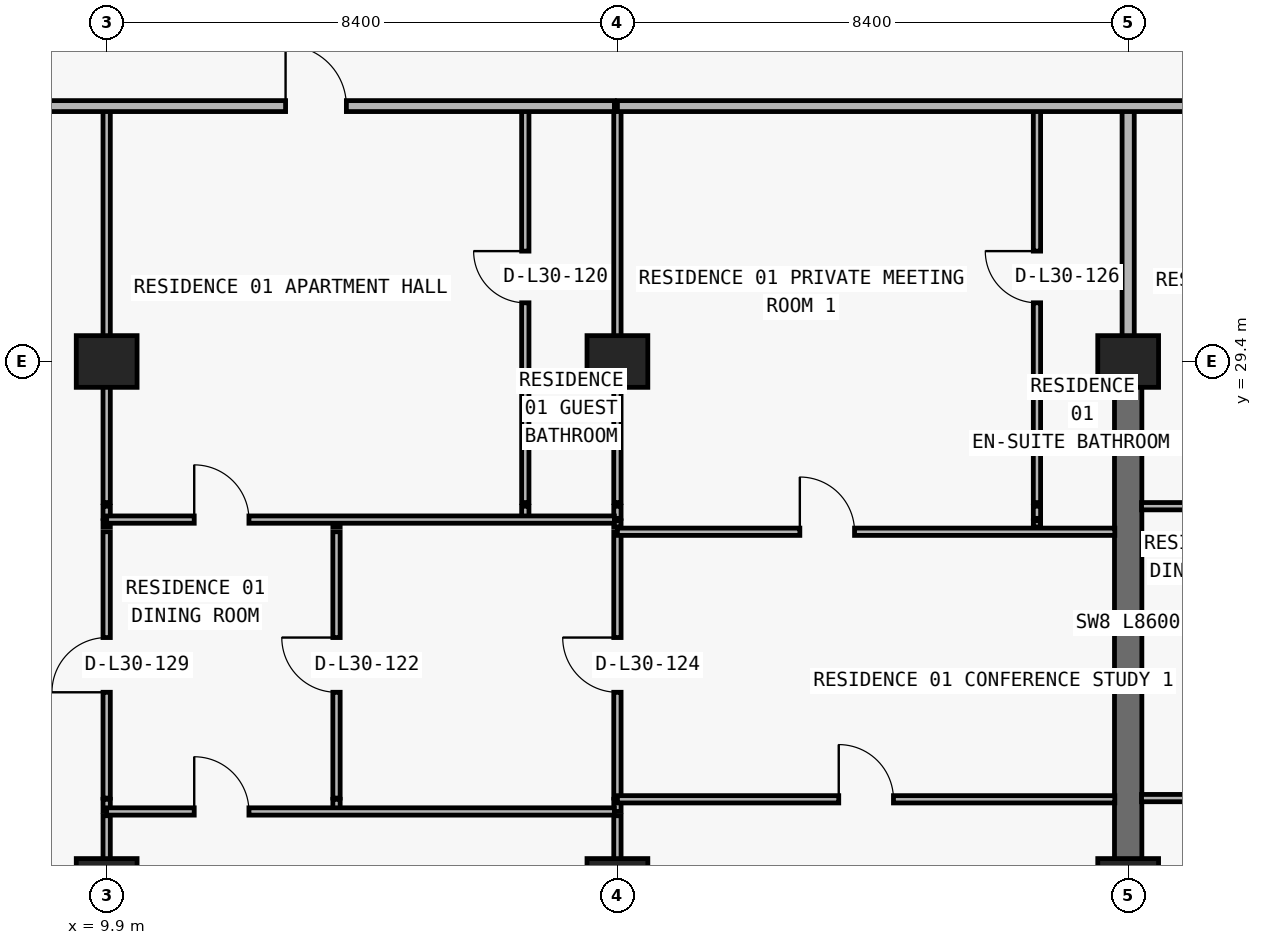
"""IFC4 building model, lengths in metres.
Left out: names, types, materials, properties, quantities, classifications, styles, units other than length and angle.
Written with IfcOpenShell. Run it as: python <this file> out.ifc"""

import sys

from ifc_helpers import new_model, si_unit, direction, frame, frame_2d, origin, origin_2d, place, context, subcontext, project, spatial, rectangle, extrude, element, fill, save


model = new_model("IFC4")
c1 = context("Model", 3, precision=1e-05, world=origin(), true_north=direction((0.0, 1.0)))
c2 = subcontext(c1, "Body", "Model", "MODEL_VIEW")
j1 = project(units=[si_unit("LENGTHUNIT", "METRE"), si_unit("PLANEANGLEUNIT", "RADIAN")], contexts=[c1])
p1 = place(None, origin())
s1 = spatial("IfcSite", under=j1, at=p1, CompositionType="ELEMENT")
p2 = place(p1, origin())
s2 = spatial("IfcBuilding", under=s1, at=p2, CompositionType="ELEMENT")
p3 = place(p2, frame((0.0, 0.0, 112.5)))
s3 = spatial("IfcBuildingStorey", under=s2, at=p3, CompositionType="ELEMENT", Elevation=112.5)
for number, where, z_axis, x_axis in (
    (1, (9.9, 20.8, 0.0), (0.0, 0.0, 1.0), (1.0, 0.0, 0.0)),
    (2, (18.3, 20.8, 0.0), (0.0, 0.0, 1.0), (1.0, 0.0, 0.0)),
    (3, (26.7, 20.8, 0.0), (0.0, 0.0, 1.0), (1.0, 0.0, 0.0)),
    (4, (9.9, 29.4, 0.0), (0.0, 0.0, 1.0), (1.0, 0.0, 0.0)),
    (5, (18.3, 29.4, 0.0), (0.0, 0.0, 1.0), (1.0, 0.0, 0.0)),
    (6, (26.7, 29.4, 0.0), (0.0, 0.0, 1.0), (1.0, 0.0, 0.0)),
):
    element("IfcColumn", number, at=place(p3, frame(where, z_axis=z_axis, x_axis=x_axis)), inside=s3, PredefinedType="COLUMN", context=c2, shape_type="SweptSolid", body=[
        extrude(rectangle(XDim=1.0, YDim=0.85, at=origin_2d()), origin(), (0.0, 0.0, 1.0), 3.05),
    ])
p4 = place(p3, frame((26.7, 20.8, 0.0), z_axis=(0.0, 0.0, 1.0), x_axis=(0.0, 1.0, 0.0)))
e7 = element("IfcWall", 7, at=p4, inside=s3, PredefinedType="SHEAR", context=c2, shape_type="SweptSolid", body=[
    extrude(rectangle(XDim=8.6, YDim=0.45, at=frame_2d((4.3, 0.0))), origin(), (0.0, 0.0, 1.0), 3.05),
])
p5 = place(p3, frame((9.9, 8.84, 0.0), z_axis=(0.0, 0.0, 1.0), x_axis=(0.0, 1.0, 0.0)))
e8 = element("IfcWall", 8, at=p5, inside=s3, PredefinedType="PARTITIONING", context=c2, shape_type="SweptSolid", body=[
    extrude(rectangle(XDim=13.09, YDim=0.12, at=frame_2d((6.545, 0.0))), origin(), (0.0, 0.0, 1.0), 2.174),
])
p6 = place(p3, frame((9.9, 22.0, 0.0), z_axis=(0.0, 0.0, 1.0), x_axis=(0.0, 1.0, 0.0)))
e9 = element("IfcWall", 9, at=p6, inside=s3, PredefinedType="PARTITIONING", context=c2, shape_type="SweptSolid", body=[
    extrude(rectangle(XDim=0.2, YDim=0.12, at=frame_2d((0.1, 0.0))), origin(), (0.0, 0.0, 1.0), 2.174),
])
p7 = place(p3, frame((9.9, 22.22, 0.0), z_axis=(0.0, 0.0, 1.0), x_axis=(0.0, 1.0, 0.0)))
e10 = element("IfcWall", 10, at=p7, inside=s3, PredefinedType="PARTITIONING", context=c2, shape_type="SweptSolid", body=[
    extrude(rectangle(XDim=4.38, YDim=0.12, at=frame_2d((2.19, 0.0))), origin(), (0.0, 0.0, 1.0), 2.174),
])
p8 = place(p7, frame((1.74, 0.0, 0.0)))
e11 = element("IfcOpeningElement", 11, at=p8, cuts=e10, PredefinedType="OPENING", context=c2, shape_type="SweptSolid", body=[
    extrude(rectangle(XDim=0.9, YDim=2.124, at=frame_2d((0.45, 1.062))), frame((0.0, 0.07, 0.0), z_axis=(0.0, -1.0, 0.0), x_axis=(1.0, 0.0, 0.0)), (0.0, 0.0, 1.0), 0.14),
])
p9 = place(p3, frame((9.9, 26.68, 0.0), z_axis=(0.0, 0.0, 1.0), x_axis=(0.0, 1.0, 0.0)))
e12 = element("IfcWall", 12, at=p9, inside=s3, PredefinedType="PARTITIONING", context=c2, shape_type="SweptSolid", body=[
    extrude(rectangle(XDim=0.1, YDim=0.12, at=frame_2d((0.05, 0.0))), origin(), (0.0, 0.0, 1.0), 2.174),
])
p10 = place(p3, frame((9.9, 26.82, 0.0), z_axis=(0.0, 0.0, 1.0), x_axis=(0.0, 1.0, 0.0)))
e13 = element("IfcWall", 13, at=p10, inside=s3, PredefinedType="PARTITIONING", context=c2, shape_type="SweptSolid", body=[
    extrude(rectangle(XDim=0.2, YDim=0.12, at=frame_2d((0.1, 0.0))), origin(), (0.0, 0.0, 1.0), 2.174),
])
p11 = place(p3, frame((9.9, 27.08, 0.0), z_axis=(0.0, 0.0, 1.0), x_axis=(0.0, 1.0, 0.0)))
e14 = element("IfcWall", 14, at=p11, inside=s3, PredefinedType="PARTITIONING", context=c2, shape_type="SweptSolid", body=[
    extrude(rectangle(XDim=6.52, YDim=0.12, at=frame_2d((3.26, 0.0))), origin(), (0.0, 0.0, 1.0), 2.174),
])
p12 = place(p3, frame((13.68, 22.0, 0.0), z_axis=(0.0, 0.0, 1.0), x_axis=(0.0, 1.0, 0.0)))
e15 = element("IfcWall", 15, at=p12, inside=s3, PredefinedType="PARTITIONING", context=c2, shape_type="SweptSolid", body=[
    extrude(rectangle(XDim=0.2, YDim=0.12, at=frame_2d((0.1, 0.0))), origin(), (0.0, 0.0, 1.0), 3.05),
])
p13 = place(p3, frame((13.68, 22.22, 0.0), z_axis=(0.0, 0.0, 1.0), x_axis=(0.0, 1.0, 0.0)))
e16 = element("IfcWall", 16, at=p13, inside=s3, PredefinedType="PARTITIONING", context=c2, shape_type="SweptSolid", body=[
    extrude(rectangle(XDim=4.38, YDim=0.12, at=frame_2d((2.19, 0.0))), origin(), (0.0, 0.0, 1.0), 3.05),
])
p14 = place(p13, frame((1.74, 0.0, 0.0)))
e17 = element("IfcOpeningElement", 17, at=p14, cuts=e16, PredefinedType="OPENING", context=c2, shape_type="SweptSolid", body=[
    extrude(rectangle(XDim=0.9, YDim=2.15, at=frame_2d((0.45, 1.075))), frame((0.0, 0.07, 0.0), z_axis=(0.0, -1.0, 0.0), x_axis=(1.0, 0.0, 0.0)), (0.0, 0.0, 1.0), 0.14),
])
p15 = place(p3, frame((13.68, 26.68, 0.0), z_axis=(0.0, 0.0, 1.0), x_axis=(0.0, 1.0, 0.0)))
e18 = element("IfcWall", 18, at=p15, inside=s3, PredefinedType="PARTITIONING", context=c2, shape_type="SweptSolid", body=[
    extrude(rectangle(XDim=0.1, YDim=0.12, at=frame_2d((0.05, 0.0))), origin(), (0.0, 0.0, 1.0), 3.05),
])
p16 = place(p3, frame((16.785, 26.82, 0.0), z_axis=(0.0, 0.0, 1.0), x_axis=(0.0, 1.0, 0.0)))
e19 = element("IfcWall", 19, at=p16, inside=s3, PredefinedType="PARTITIONING", context=c2, shape_type="SweptSolid", body=[
    extrude(rectangle(XDim=0.2, YDim=0.12, at=frame_2d((0.1, 0.0))), origin(), (0.0, 0.0, 1.0), 3.05),
])
p17 = place(p3, frame((16.785, 27.08, 0.0), z_axis=(0.0, 0.0, 1.0), x_axis=(0.0, 1.0, 0.0)))
e20 = element("IfcWall", 20, at=p17, inside=s3, PredefinedType="PARTITIONING", context=c2, shape_type="SweptSolid", body=[
    extrude(rectangle(XDim=6.52, YDim=0.12, at=frame_2d((3.26, 0.0))), origin(), (0.0, 0.0, 1.0), 3.05),
])
p18 = place(p17, frame((3.285, 0.0, 0.0)))
e21 = element("IfcOpeningElement", 21, at=p18, cuts=e20, PredefinedType="OPENING", context=c2, shape_type="SweptSolid", body=[
    extrude(rectangle(XDim=0.85, YDim=2.1, at=frame_2d((0.425, 1.05))), frame((0.0, 0.07, 0.0), z_axis=(0.0, -1.0, 0.0), x_axis=(1.0, 0.0, 0.0)), (0.0, 0.0, 1.0), 0.14),
])
p19 = place(p3, frame((18.3, 8.84, 0.0), z_axis=(0.0, 0.0, 1.0), x_axis=(0.0, 1.0, 0.0)))
e22 = element("IfcWall", 22, at=p19, inside=s3, PredefinedType="PARTITIONING", context=c2, shape_type="SweptSolid", body=[
    extrude(rectangle(XDim=13.09, YDim=0.12, at=frame_2d((6.545, 0.0))), origin(), (0.0, 0.0, 1.0), 2.174),
])
p20 = place(p3, frame((18.3, 22.0, 0.0), z_axis=(0.0, 0.0, 1.0), x_axis=(0.0, 1.0, 0.0)))
e23 = element("IfcWall", 23, at=p20, inside=s3, PredefinedType="PARTITIONING", context=c2, shape_type="SweptSolid", body=[
    extrude(rectangle(XDim=0.2, YDim=0.12, at=frame_2d((0.1, 0.0))), origin(), (0.0, 0.0, 1.0), 2.174),
])
p21 = place(p3, frame((18.3, 22.22, 0.0), z_axis=(0.0, 0.0, 1.0), x_axis=(0.0, 1.0, 0.0)))
e24 = element("IfcWall", 24, at=p21, inside=s3, PredefinedType="PARTITIONING", context=c2, shape_type="SweptSolid", body=[
    extrude(rectangle(XDim=4.38, YDim=0.12, at=frame_2d((2.19, 0.0))), origin(), (0.0, 0.0, 1.0), 2.174),
])
p22 = place(p21, frame((1.74, 0.0, 0.0)))
e25 = element("IfcOpeningElement", 25, at=p22, cuts=e24, PredefinedType="OPENING", context=c2, shape_type="SweptSolid", body=[
    extrude(rectangle(XDim=0.9, YDim=2.124, at=frame_2d((0.45, 1.062))), frame((0.0, 0.07, 0.0), z_axis=(0.0, -1.0, 0.0), x_axis=(1.0, 0.0, 0.0)), (0.0, 0.0, 1.0), 0.14),
])
p23 = place(p3, frame((18.3, 26.68, 0.0), z_axis=(0.0, 0.0, 1.0), x_axis=(0.0, 1.0, 0.0)))
e26 = element("IfcWall", 26, at=p23, inside=s3, PredefinedType="PARTITIONING", context=c2, shape_type="SweptSolid", body=[
    extrude(rectangle(XDim=0.1, YDim=0.12, at=frame_2d((0.05, 0.0))), origin(), (0.0, 0.0, 1.0), 2.174),
])
p24 = place(p3, frame((18.3, 26.82, 0.0), z_axis=(0.0, 0.0, 1.0), x_axis=(0.0, 1.0, 0.0)))
e27 = element("IfcWall", 27, at=p24, inside=s3, PredefinedType="PARTITIONING", context=c2, shape_type="SweptSolid", body=[
    extrude(rectangle(XDim=0.2, YDim=0.12, at=frame_2d((0.1, 0.0))), origin(), (0.0, 0.0, 1.0), 2.174),
])
p25 = place(p3, frame((18.3, 27.08, 0.0), z_axis=(0.0, 0.0, 1.0), x_axis=(0.0, 1.0, 0.0)))
e28 = element("IfcWall", 28, at=p25, inside=s3, PredefinedType="PARTITIONING", context=c2, shape_type="SweptSolid", body=[
    extrude(rectangle(XDim=6.52, YDim=0.12, at=frame_2d((3.26, 0.0))), origin(), (0.0, 0.0, 1.0), 2.174),
])
p26 = place(p3, frame((25.2, 26.68, 0.0), z_axis=(0.0, 0.0, 1.0), x_axis=(0.0, 1.0, 0.0)))
e29 = element("IfcWall", 29, at=p26, inside=s3, PredefinedType="PARTITIONING", context=c2, shape_type="SweptSolid", body=[
    extrude(rectangle(XDim=0.1, YDim=0.12, at=frame_2d((0.05, 0.0))), origin(), (0.0, 0.0, 1.0), 3.05),
])
p27 = place(p3, frame((25.2, 26.82, 0.0), z_axis=(0.0, 0.0, 1.0), x_axis=(0.0, 1.0, 0.0)))
e30 = element("IfcWall", 30, at=p27, inside=s3, PredefinedType="PARTITIONING", context=c2, shape_type="SweptSolid", body=[
    extrude(rectangle(XDim=0.2, YDim=0.12, at=frame_2d((0.1, 0.0))), origin(), (0.0, 0.0, 1.0), 3.05),
])
p28 = place(p3, frame((25.2, 27.08, 0.0), z_axis=(0.0, 0.0, 1.0), x_axis=(0.0, 1.0, 0.0)))
e31 = element("IfcWall", 31, at=p28, inside=s3, PredefinedType="PARTITIONING", context=c2, shape_type="SweptSolid", body=[
    extrude(rectangle(XDim=6.52, YDim=0.12, at=frame_2d((3.26, 0.0))), origin(), (0.0, 0.0, 1.0), 3.05),
])
p29 = place(p28, frame((3.285, 0.0, 0.0)))
e32 = element("IfcOpeningElement", 32, at=p29, cuts=e31, PredefinedType="OPENING", context=c2, shape_type="SweptSolid", body=[
    extrude(rectangle(XDim=0.85, YDim=2.1, at=frame_2d((0.425, 1.05))), frame((0.0, 0.07, 0.0), z_axis=(0.0, -1.0, 0.0), x_axis=(1.0, 0.0, 0.0)), (0.0, 0.0, 1.0), 0.14),
])
p30 = place(p3, frame((26.7, 29.405, 0.0), z_axis=(0.0, 0.0, 1.0), x_axis=(0.0, 1.0, 0.0)))
e33 = element("IfcWall", 33, at=p30, inside=s3, PredefinedType="PARTITIONING", context=c2, shape_type="SweptSolid", body=[
    extrude(rectangle(XDim=4.195, YDim=0.2, at=frame_2d((2.098, 0.0))), origin(), (0.0, 0.0, 1.0), 2.335),
])
p31 = place(p3, frame((9.9, 22.0, 0.0), z_axis=(0.0, 0.0, 1.0), x_axis=(1.0, 0.0, 0.0)))
e34 = element("IfcWall", 34, at=p31, inside=s3, PredefinedType="PARTITIONING", context=c2, shape_type="SweptSolid", body=[
    extrude(rectangle(XDim=8.35, YDim=0.12, at=frame_2d((4.175, 0.0))), origin(), (0.0, 0.0, 1.0), 3.05),
])
p32 = place(p31, frame((1.44, 0.0, 0.0)))
e35 = element("IfcOpeningElement", 35, at=p32, cuts=e34, PredefinedType="OPENING", context=c2, shape_type="SweptSolid", body=[
    extrude(rectangle(XDim=0.9, YDim=2.15, at=frame_2d((0.45, 1.075))), frame((0.0, 0.07, 0.0), z_axis=(0.0, -1.0, 0.0), x_axis=(1.0, 0.0, 0.0)), (0.0, 0.0, 1.0), 0.14),
])
p33 = place(p3, frame((18.3, 22.2, 0.0), z_axis=(0.0, 0.0, 1.0), x_axis=(1.0, 0.0, 0.0)))
e36 = element("IfcWall", 36, at=p33, inside=s3, PredefinedType="PARTITIONING", context=c2, shape_type="SweptSolid", body=[
    extrude(rectangle(XDim=8.18, YDim=0.12, at=frame_2d((4.09, 0.0))), origin(), (0.0, 0.0, 1.0), 3.05),
])
p34 = place(p33, frame((3.64, 0.0, 0.0)))
e37 = element("IfcOpeningElement", 37, at=p34, cuts=e36, PredefinedType="OPENING", context=c2, shape_type="SweptSolid", body=[
    extrude(rectangle(XDim=0.9, YDim=2.15, at=frame_2d((0.45, 1.075))), frame((0.0, 0.07, 0.0), z_axis=(0.0, -1.0, 0.0), x_axis=(1.0, 0.0, 0.0)), (0.0, 0.0, 1.0), 0.14),
])
p35 = place(p3, frame((26.92, 22.22, 0.0), z_axis=(0.0, 0.0, 1.0), x_axis=(1.0, 0.0, 0.0)))
e38 = element("IfcWall", 38, at=p35, inside=s3, PredefinedType="PARTITIONING", context=c2, shape_type="SweptSolid", body=[
    extrude(rectangle(XDim=8.18, YDim=0.12, at=frame_2d((4.09, 0.0))), origin(), (0.0, 0.0, 1.0), 3.05),
])
p36 = place(p35, frame((1.204, 0.0, 0.0)))
e39 = element("IfcOpeningElement", 39, at=p36, cuts=e38, PredefinedType="OPENING", context=c2, shape_type="SweptSolid", body=[
    extrude(rectangle(XDim=0.9, YDim=2.15, at=frame_2d((0.45, 1.075))), frame((0.0, 0.07, 0.0), z_axis=(0.0, -1.0, 0.0), x_axis=(1.0, 0.0, 0.0)), (0.0, 0.0, 1.0), 0.14),
])
p37 = place(p3, frame((18.3, 26.6, 0.0), z_axis=(0.0, 0.0, 1.0), x_axis=(1.0, 0.0, 0.0)))
e40 = element("IfcWall", 40, at=p37, inside=s3, PredefinedType="PARTITIONING", context=c2, shape_type="SweptSolid", body=[
    extrude(rectangle(XDim=8.18, YDim=0.12, at=frame_2d((4.09, 0.0))), origin(), (0.0, 0.0, 1.0), 3.05),
])
p38 = place(p37, frame((3.0, 0.0, 0.0)))
e41 = element("IfcOpeningElement", 41, at=p38, cuts=e40, PredefinedType="OPENING", context=c2, shape_type="SweptSolid", body=[
    extrude(rectangle(XDim=0.9, YDim=2.15, at=frame_2d((0.45, 1.075))), frame((0.0, 0.07, 0.0), z_axis=(0.0, -1.0, 0.0), x_axis=(1.0, 0.0, 0.0)), (0.0, 0.0, 1.0), 0.14),
])
p39 = place(p3, frame((9.9, 26.8, 0.0), z_axis=(0.0, 0.0, 1.0), x_axis=(1.0, 0.0, 0.0)))
e42 = element("IfcWall", 42, at=p39, inside=s3, PredefinedType="PARTITIONING", context=c2, shape_type="SweptSolid", body=[
    extrude(rectangle(XDim=8.35, YDim=0.12, at=frame_2d((4.175, 0.0))), origin(), (0.0, 0.0, 1.0), 3.05),
])
p40 = place(p39, frame((1.44, 0.0, 0.0)))
e43 = element("IfcOpeningElement", 43, at=p40, cuts=e42, PredefinedType="OPENING", context=c2, shape_type="SweptSolid", body=[
    extrude(rectangle(XDim=0.9, YDim=2.15, at=frame_2d((0.45, 1.075))), frame((0.0, 0.07, 0.0), z_axis=(0.0, -1.0, 0.0), x_axis=(1.0, 0.0, 0.0)), (0.0, 0.0, 1.0), 0.14),
])
p41 = place(p3, frame((26.92, 27.02, 0.0), z_axis=(0.0, 0.0, 1.0), x_axis=(1.0, 0.0, 0.0)))
e44 = element("IfcWall", 44, at=p41, inside=s3, PredefinedType="PARTITIONING", context=c2, shape_type="SweptSolid", body=[
    extrude(rectangle(XDim=8.175, YDim=0.12, at=frame_2d((4.087, 0.0))), origin(), (0.0, 0.0, 1.0), 3.05),
])
p42 = place(p41, frame((1.204, 0.0, 0.0)))
e45 = element("IfcOpeningElement", 45, at=p42, cuts=e44, PredefinedType="OPENING", context=c2, shape_type="SweptSolid", body=[
    extrude(rectangle(XDim=0.9, YDim=2.15, at=frame_2d((0.45, 1.075))), frame((0.0, 0.07, 0.0), z_axis=(0.0, -1.0, 0.0), x_axis=(1.0, 0.0, 0.0)), (0.0, 0.0, 1.0), 0.14),
])
p43 = place(p3, frame((7.705, 33.6, 0.0), z_axis=(0.0, 0.0, 1.0), x_axis=(1.0, 0.0, 0.0)))
e46 = element("IfcWall", 46, at=p43, inside=s3, PredefinedType="PARTITIONING", context=c2, shape_type="SweptSolid", body=[
    extrude(rectangle(XDim=10.545, YDim=0.18, at=frame_2d((5.272, 0.0))), origin(), (0.0, 0.0, 1.0), 3.05),
])
p44 = place(p43, frame((5.137, 0.0, 0.0)))
e47 = element("IfcOpeningElement", 47, at=p44, cuts=e46, PredefinedType="OPENING", context=c2, shape_type="SweptSolid", body=[
    extrude(rectangle(XDim=1.0, YDim=2.2, at=frame_2d((0.5, 1.1))), frame((0.0, 0.1, 0.0), z_axis=(0.0, -1.0, 0.0), x_axis=(1.0, 0.0, 0.0)), (0.0, 0.0, 1.0), 0.2),
])
p45 = place(p3, frame((18.3, 33.6, 0.0), z_axis=(0.0, 0.0, 1.0), x_axis=(1.0, 0.0, 0.0)))
e48 = element("IfcWall", 48, at=p45, inside=s3, PredefinedType="PARTITIONING", context=c2, shape_type="SweptSolid", body=[
    extrude(rectangle(XDim=41.2, YDim=0.18, at=frame_2d((20.6, 0.0))), origin(), (0.0, 0.0, 1.0), 3.05),
])
p46 = place(p45, frame((11.35, 0.0, 0.0)))
e49 = element("IfcOpeningElement", 49, at=p46, cuts=e48, PredefinedType="OPENING", context=c2, shape_type="SweptSolid", body=[
    extrude(rectangle(XDim=1.0, YDim=2.2, at=frame_2d((0.5, 1.1))), frame((0.0, 0.1, 0.0), z_axis=(0.0, -1.0, 0.0), x_axis=(1.0, 0.0, 0.0)), (0.0, 0.0, 1.0), 0.2),
])
p47 = place(p45, frame((27.275, 0.0, 0.0)))
e50 = element("IfcOpeningElement", 50, at=p47, cuts=e48, PredefinedType="OPENING", context=c2, shape_type="SweptSolid", body=[
    extrude(rectangle(XDim=1.0, YDim=2.2, at=frame_2d((0.5, 1.1))), frame((0.0, 0.1, 0.0), z_axis=(0.0, -1.0, 0.0), x_axis=(1.0, 0.0, 0.0)), (0.0, 0.0, 1.0), 0.2),
])
p48 = place(p45, frame((35.675, 0.0, 0.0)))
e51 = element("IfcOpeningElement", 51, at=p48, cuts=e48, PredefinedType="OPENING", context=c2, shape_type="SweptSolid", body=[
    extrude(rectangle(XDim=1.0, YDim=2.2, at=frame_2d((0.5, 1.1))), frame((0.0, 0.1, 0.0), z_axis=(0.0, -1.0, 0.0), x_axis=(1.0, 0.0, 0.0)), (0.0, 0.0, 1.0), 0.2),
])
p49 = place(p44, origin())
e52 = element("IfcDoor", 52, at=p49, inside=s3, OperationType="SINGLE_SWING_LEFT", PredefinedType="DOOR", context=c2, shape_type="SweptSolid", body=[
    extrude(rectangle(XDim=1.0, YDim=2.2, at=frame_2d((0.5, 1.1))), frame((0.0, 0.025, 0.0), z_axis=(0.0, -1.0, 0.0), x_axis=(1.0, 0.0, 0.0)), (0.0, 0.0, 1.0), 0.05),
])
fill(e47, e52)
p50 = place(p18, origin())
e53 = element("IfcDoor", 53, at=p50, inside=s3, OperationType="SINGLE_SWING_RIGHT", PredefinedType="DOOR", context=c2, shape_type="SweptSolid", body=[
    extrude(rectangle(XDim=0.85, YDim=2.1, at=frame_2d((0.425, 1.05))), frame((0.0, 0.025, 0.0), z_axis=(0.0, -1.0, 0.0), x_axis=(1.0, 0.0, 0.0)), (0.0, 0.0, 1.0), 0.05),
])
fill(e21, e53)
p51 = place(p40, origin())
e54 = element("IfcDoor", 54, at=p51, inside=s3, OperationType="SINGLE_SWING_LEFT", PredefinedType="DOOR", context=c2, shape_type="SweptSolid", body=[
    extrude(rectangle(XDim=0.9, YDim=2.15, at=frame_2d((0.45, 1.075))), frame((0.0, 0.025, 0.0), z_axis=(0.0, -1.0, 0.0), x_axis=(1.0, 0.0, 0.0)), (0.0, 0.0, 1.0), 0.05),
])
fill(e43, e54)
p52 = place(p14, origin())
e55 = element("IfcDoor", 55, at=p52, inside=s3, OperationType="SINGLE_SWING_RIGHT", PredefinedType="DOOR", context=c2, shape_type="SweptSolid", body=[
    extrude(rectangle(XDim=0.9, YDim=2.15, at=frame_2d((0.45, 1.075))), frame((0.0, 0.025, 0.0), z_axis=(0.0, -1.0, 0.0), x_axis=(1.0, 0.0, 0.0)), (0.0, 0.0, 1.0), 0.05),
])
fill(e17, e55)
p53 = place(p32, origin())
e56 = element("IfcDoor", 56, at=p53, inside=s3, OperationType="SINGLE_SWING_LEFT", PredefinedType="DOOR", context=c2, shape_type="SweptSolid", body=[
    extrude(rectangle(XDim=0.9, YDim=2.15, at=frame_2d((0.45, 1.075))), frame((0.0, 0.025, 0.0), z_axis=(0.0, -1.0, 0.0), x_axis=(1.0, 0.0, 0.0)), (0.0, 0.0, 1.0), 0.05),
])
fill(e35, e56)
p54 = place(p22, origin())
e57 = element("IfcDoor", 57, at=p54, inside=s3, OperationType="SINGLE_SWING_RIGHT", PredefinedType="DOOR", context=c2, shape_type="SweptSolid", body=[
    extrude(rectangle(XDim=0.9, YDim=2.124, at=frame_2d((0.45, 1.062))), frame((0.0, 0.025, 0.0), z_axis=(0.0, -1.0, 0.0), x_axis=(1.0, 0.0, 0.0)), (0.0, 0.0, 1.0), 0.05),
])
fill(e25, e57)
p55 = place(p38, origin())
e58 = element("IfcDoor", 58, at=p55, inside=s3, OperationType="SINGLE_SWING_LEFT", PredefinedType="DOOR", context=c2, shape_type="SweptSolid", body=[
    extrude(rectangle(XDim=0.9, YDim=2.15, at=frame_2d((0.45, 1.075))), frame((0.0, 0.025, 0.0), z_axis=(0.0, -1.0, 0.0), x_axis=(1.0, 0.0, 0.0)), (0.0, 0.0, 1.0), 0.05),
])
fill(e41, e58)
p56 = place(p29, origin())
e59 = element("IfcDoor", 59, at=p56, inside=s3, OperationType="SINGLE_SWING_RIGHT", PredefinedType="DOOR", context=c2, shape_type="SweptSolid", body=[
    extrude(rectangle(XDim=0.85, YDim=2.1, at=frame_2d((0.425, 1.05))), frame((0.0, 0.025, 0.0), z_axis=(0.0, -1.0, 0.0), x_axis=(1.0, 0.0, 0.0)), (0.0, 0.0, 1.0), 0.05),
])
fill(e32, e59)
p57 = place(p34, origin())
e60 = element("IfcDoor", 60, at=p57, inside=s3, OperationType="SINGLE_SWING_LEFT", PredefinedType="DOOR", context=c2, shape_type="SweptSolid", body=[
    extrude(rectangle(XDim=0.9, YDim=2.15, at=frame_2d((0.45, 1.075))), frame((0.0, 0.025, 0.0), z_axis=(0.0, -1.0, 0.0), x_axis=(1.0, 0.0, 0.0)), (0.0, 0.0, 1.0), 0.05),
])
fill(e37, e60)
p58 = place(p8, origin())
e61 = element("IfcDoor", 61, at=p58, inside=s3, OperationType="SINGLE_SWING_LEFT", PredefinedType="DOOR", context=c2, shape_type="SweptSolid", body=[
    extrude(rectangle(XDim=0.9, YDim=2.124, at=frame_2d((0.45, 1.062))), frame((0.0, 0.025, 0.0), z_axis=(0.0, -1.0, 0.0), x_axis=(1.0, 0.0, 0.0)), (0.0, 0.0, 1.0), 0.05),
])
fill(e11, e61)
save(model, sys.argv[1])
